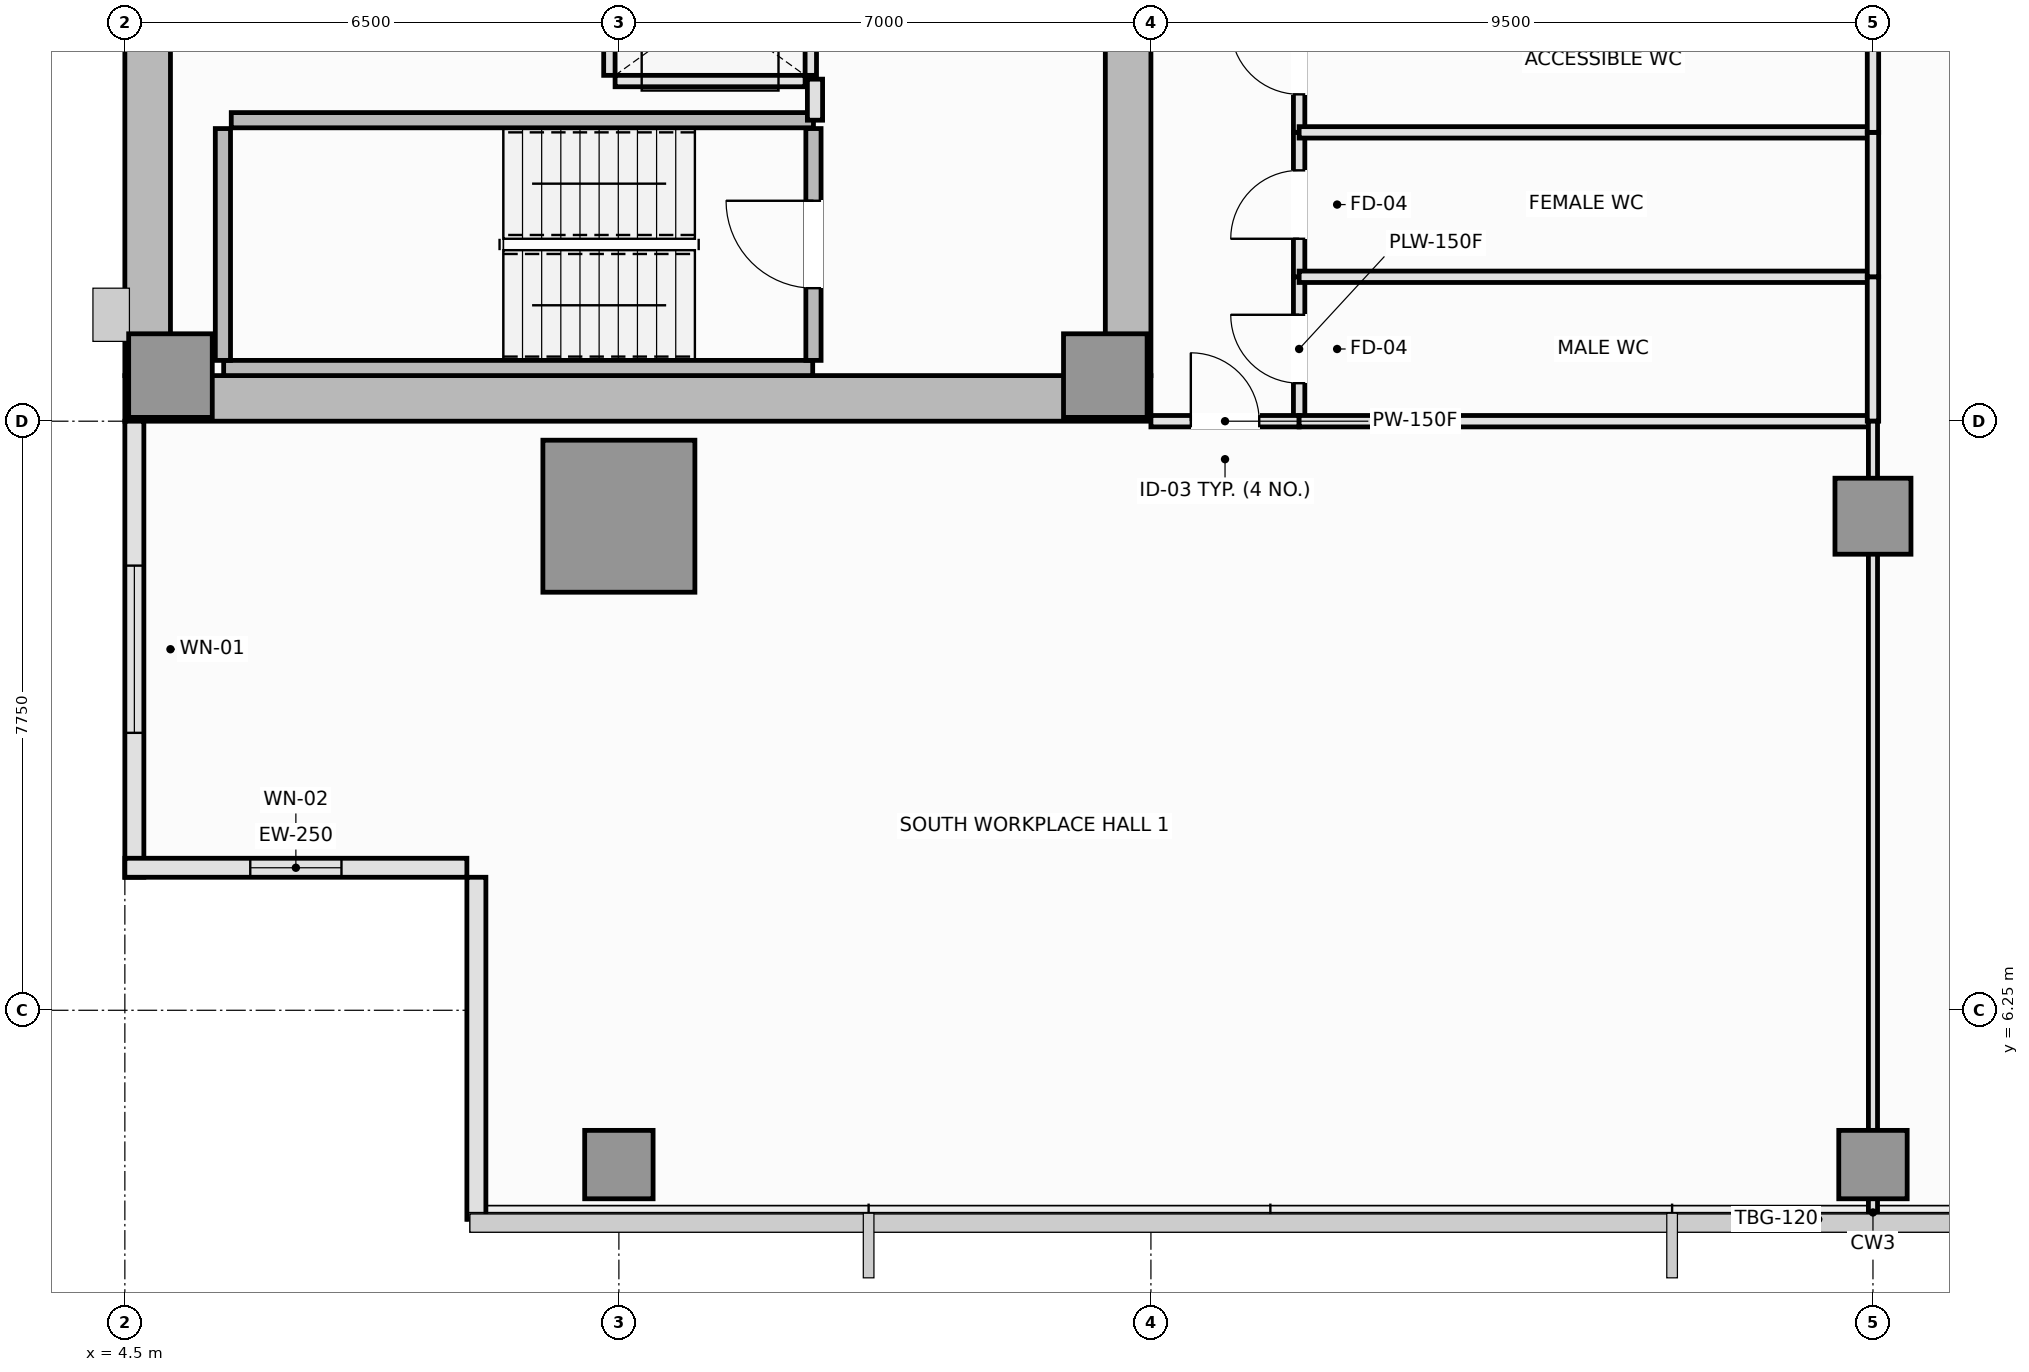
"""IFC4 building model, lengths in metres.
Left out: names, types, materials, properties, quantities, classifications, styles, units other than length and angle.
Written with IfcOpenShell. Run it as: python <this file> out.ifc"""

import sys

from ifc_helpers import new_model, si_unit, direction, frame, frame_2d, origin, origin_2d, place, context, subcontext, project, spatial, rectangle, extrude, element, fill, save


model = new_model("IFC4")
c1 = context("Model", 3, precision=1e-05, world=origin(), true_north=direction((0.0, 1.0)))
c2 = subcontext(c1, "Body", "Model", "MODEL_VIEW")
j1 = project(units=[si_unit("LENGTHUNIT", "METRE"), si_unit("PLANEANGLEUNIT", "RADIAN")], contexts=[c1])
p1 = place(None, origin())
s1 = spatial("IfcSite", under=j1, at=p1, CompositionType="ELEMENT")
p2 = place(p1, origin())
s2 = spatial("IfcBuilding", under=s1, at=p2, CompositionType="ELEMENT")
p3 = place(p2, frame((0.0, 0.0, 116.45)))
s3 = spatial("IfcBuildingStorey", under=s2, at=p3, CompositionType="ELEMENT", Elevation=116.45)
p4 = place(p3, frame((4.5, 14.3, 0.0), z_axis=(0.0, 0.0, 1.0), x_axis=(1.0, 0.0, 0.0)))
e1 = element("IfcWall", 1, at=p4, inside=s3, PredefinedType="SHEAR", context=c2, shape_type="SweptSolid", body=[
    extrude(rectangle(XDim=13.5, YDim=0.6, at=frame_2d((6.75, 0.0))), origin(), (0.0, 0.0, 1.0), 3.55),
])
p5 = place(p3, frame((4.8, 14.6, 0.0), z_axis=(0.0, 0.0, 1.0), x_axis=(0.0, 1.0, 0.0)))
e2 = element("IfcWall", 2, at=p5, inside=s3, PredefinedType="SHEAR", context=c2, shape_type="SweptSolid", body=[
    extrude(rectangle(XDim=21.3, YDim=0.6, at=frame_2d((10.65, 0.0))), origin(), (0.0, 0.0, 1.0), 3.55),
])
p6 = place(p3, frame((17.7, 14.6, 0.0), z_axis=(0.0, 0.0, 1.0), x_axis=(0.0, 1.0, 0.0)))
e3 = element("IfcWall", 3, at=p6, inside=s3, PredefinedType="SHEAR", context=c2, shape_type="SweptSolid", body=[
    extrude(rectangle(XDim=8.85, YDim=0.6, at=frame_2d((4.425, 0.0))), origin(), (0.0, 0.0, 1.0), 3.55),
])
p7 = place(p6, frame((4.3, 0.0, 0.0)))
e4 = element("IfcOpeningElement", 4, at=p7, cuts=e3, PredefinedType="OPENING", context=c2, shape_type="SweptSolid", body=[
    extrude(rectangle(XDim=1.1, YDim=2.15, at=frame_2d((0.55, 1.075))), frame((0.0, 0.31, 0.0), z_axis=(0.0, -1.0, 0.0), x_axis=(1.0, 0.0, 0.0)), (0.0, 0.0, 1.0), 0.62),
])
for number, where, z_axis, x_axis in (
    (5, (5.1, 14.6, 0.0), (0.0, 0.0, 1.0), (1.0, 0.0, 0.0)),
    (6, (17.4, 14.6, 0.0), (0.0, 0.0, 1.0), (1.0, 0.0, 0.0)),
):
    element("IfcColumn", number, at=place(p3, frame(where, z_axis=z_axis, x_axis=x_axis)), inside=s3, PredefinedType="PILASTER", context=c2, shape_type="SweptSolid", body=[
        extrude(rectangle(XDim=1.1, YDim=1.1, at=origin_2d()), origin(), (0.0, 0.0, 1.0), 3.55),
    ])
p8 = place(p3, frame((11.0, 12.75, 0.0), z_axis=(0.0, 0.0, 1.0), x_axis=(1.0, 0.0, 0.0)))
e7 = element("IfcColumn", 7, at=p8, inside=s3, PredefinedType="COLUMN", context=c2, shape_type="SweptSolid", body=[
    extrude(rectangle(XDim=2.0, YDim=2.0, at=origin_2d()), origin(), (0.0, 0.0, 1.0), 3.55),
])
p9 = place(p3, frame((27.5, 12.75, 0.0), z_axis=(0.0, 0.0, 1.0), x_axis=(1.0, 0.0, 0.0)))
e8 = element("IfcColumn", 8, at=p9, inside=s3, PredefinedType="COLUMN", context=c2, shape_type="SweptSolid", body=[
    extrude(rectangle(XDim=1.0, YDim=1.0, at=origin_2d()), origin(), (0.0, 0.0, 1.0), 3.55),
])
for number, where, z_axis, x_axis in (
    (9, (11.0, 4.22, 0.0), (0.0, 0.0, 1.0), (1.0, 0.0, 0.0)),
    (10, (27.5, 4.22, 0.0), (0.0, 0.0, 1.0), (1.0, 0.0, 0.0)),
):
    element("IfcColumn", number, at=place(p3, frame(where, z_axis=z_axis, x_axis=x_axis)), inside=s3, PredefinedType="COLUMN", context=c2, shape_type="SweptSolid", body=[
        extrude(rectangle(XDim=0.9, YDim=0.9, at=origin_2d()), origin(), (0.0, 0.0, 1.0), 3.55),
    ])
p10 = place(p3, frame((4.625, 14.0, 0.0), z_axis=(0.0, 0.0, 1.0), x_axis=(0.0, -1.0, 0.0)))
e11 = element("IfcWall", 11, at=p10, inside=s3, PredefinedType="SOLIDWALL", context=c2, shape_type="SweptSolid", body=[
    extrude(rectangle(XDim=6.0, YDim=0.25, at=frame_2d((3.0, 0.0))), origin(), (0.0, 0.0, 1.0), 3.37),
])
p11 = place(p10, frame((1.9, 0.0, 0.9)))
e12 = element("IfcOpeningElement", 12, at=p11, cuts=e11, PredefinedType="OPENING", context=c2, shape_type="SweptSolid", body=[
    extrude(rectangle(XDim=2.2, YDim=1.8, at=frame_2d((1.1, 0.9))), frame((0.0, 0.135, 0.0), z_axis=(0.0, -1.0, 0.0), x_axis=(1.0, 0.0, 0.0)), (0.0, 0.0, 1.0), 0.27),
])
p12 = place(p3, frame((4.5, 8.125, 0.0), z_axis=(0.0, 0.0, 1.0), x_axis=(1.0, 0.0, 0.0)))
e13 = element("IfcWall", 13, at=p12, inside=s3, PredefinedType="SOLIDWALL", context=c2, shape_type="SweptSolid", body=[
    extrude(rectangle(XDim=4.5, YDim=0.25, at=frame_2d((2.25, 0.0))), origin(), (0.0, 0.0, 1.0), 3.37),
])
p13 = place(p12, frame((1.65, 0.0, 0.9)))
e14 = element("IfcOpeningElement", 14, at=p13, cuts=e13, PredefinedType="OPENING", context=c2, shape_type="SweptSolid", body=[
    extrude(rectangle(XDim=1.2, YDim=1.8, at=frame_2d((0.6, 0.9))), frame((0.0, 0.135, 0.0), z_axis=(0.0, -1.0, 0.0), x_axis=(1.0, 0.0, 0.0)), (0.0, 0.0, 1.0), 0.27),
])
p14 = place(p3, frame((9.125, 8.0, 0.0), z_axis=(0.0, 0.0, 1.0), x_axis=(0.0, -1.0, 0.0)))
e15 = element("IfcWall", 15, at=p14, inside=s3, PredefinedType="SOLIDWALL", context=c2, shape_type="SweptSolid", body=[
    extrude(rectangle(XDim=4.5, YDim=0.25, at=frame_2d((2.25, 0.0))), origin(), (0.0, 0.0, 1.0), 3.37),
])
p15 = place(p3, frame((5.8, 14.7, 0.0), z_axis=(0.0, 0.0, 1.0), x_axis=(1.0, 0.0, 0.0)))
e16 = element("IfcWall", 16, at=p15, inside=s3, PredefinedType="SOLIDWALL", context=c2, shape_type="SweptSolid", body=[
    extrude(rectangle(XDim=7.75, YDim=0.2, at=frame_2d((3.875, 0.0))), origin(), (0.0, 0.0, 1.0), 3.55),
])
p16 = place(p3, frame((5.79, 14.8, 0.0), z_axis=(0.0, 0.0, 1.0), x_axis=(0.0, 1.0, 0.0)))
e17 = element("IfcWall", 17, at=p16, inside=s3, PredefinedType="SOLIDWALL", context=c2, shape_type="SweptSolid", body=[
    extrude(rectangle(XDim=3.05, YDim=0.2, at=frame_2d((1.525, 0.0))), origin(), (0.0, 0.0, 1.0), 3.55),
])
p17 = place(p3, frame((5.9, 17.96, 0.0), z_axis=(0.0, 0.0, 1.0), x_axis=(1.0, 0.0, 0.0)))
e18 = element("IfcWall", 18, at=p17, inside=s3, PredefinedType="SOLIDWALL", context=c2, shape_type="SweptSolid", body=[
    extrude(rectangle(XDim=7.66, YDim=0.2, at=frame_2d((3.83, 0.0))), origin(), (0.0, 0.0, 1.0), 3.55),
])
p18 = place(p3, frame((13.56, 14.8, 0.0), z_axis=(0.0, 0.0, 1.0), x_axis=(0.0, 1.0, 0.0)))
e19 = element("IfcWall", 19, at=p18, inside=s3, PredefinedType="SOLIDWALL", context=c2, shape_type="SweptSolid", body=[
    extrude(rectangle(XDim=3.05, YDim=0.2, at=frame_2d((1.525, 0.0))), origin(), (0.0, 0.0, 1.0), 3.55),
])
p19 = place(p18, frame((0.95, 0.0, 0.0)))
e20 = element("IfcOpeningElement", 20, at=p19, cuts=e19, PredefinedType="OPENING", context=c2, shape_type="SweptSolid", body=[
    extrude(rectangle(XDim=1.15, YDim=2.15, at=frame_2d((0.575, 1.075))), frame((0.0, 0.11, 0.0), z_axis=(0.0, -1.0, 0.0), x_axis=(1.0, 0.0, 0.0)), (0.0, 0.0, 1.0), 0.22),
])
p20 = place(p3, frame((10.95, 18.475, 0.0), z_axis=(0.0, 0.0, 1.0), x_axis=(1.0, 0.0, 0.0)))
e21 = element("IfcWall", 21, at=p20, inside=s3, PredefinedType="PARTITIONING", context=c2, shape_type="SweptSolid", body=[
    extrude(rectangle(XDim=2.5, YDim=0.15, at=frame_2d((1.25, 0.0))), origin(), (0.0, 0.0, 1.0), 3.37),
])
p21 = place(p3, frame((10.875, 18.55, 0.0), z_axis=(0.0, 0.0, 1.0), x_axis=(0.0, 1.0, 0.0)))
e22 = element("IfcWall", 22, at=p21, inside=s3, PredefinedType="PARTITIONING", context=c2, shape_type="SweptSolid", body=[
    extrude(rectangle(XDim=1.8, YDim=0.15, at=frame_2d((0.9, 0.0))), origin(), (0.0, 0.0, 1.0), 3.37),
])
p22 = place(p3, frame((13.525, 18.55, 0.0), z_axis=(0.0, 0.0, 1.0), x_axis=(0.0, 1.0, 0.0)))
e23 = element("IfcWall", 23, at=p22, inside=s3, PredefinedType="PARTITIONING", context=c2, shape_type="SweptSolid", body=[
    extrude(rectangle(XDim=1.8, YDim=0.15, at=frame_2d((0.9, 0.0))), origin(), (0.0, 0.0, 1.0), 3.37),
])
p23 = place(p22, frame((0.35, 0.0, 0.0)))
e24 = element("IfcOpeningElement", 24, at=p23, cuts=e23, PredefinedType="OPENING", context=c2, shape_type="SweptSolid", body=[
    extrude(rectangle(XDim=1.1, YDim=2.2, at=frame_2d((0.55, 1.1))), frame((0.0, 0.085, 0.0), z_axis=(0.0, -1.0, 0.0), x_axis=(1.0, 0.0, 0.0)), (0.0, 0.0, 1.0), 0.17),
])
p24 = place(p3, frame((13.58, 17.96, 0.0), z_axis=(0.0, 0.0, 1.0), x_axis=(0.0, 1.0, 0.0)))
e25 = element("IfcWall", 25, at=p24, inside=s3, PredefinedType="PARTITIONING", context=c2, shape_type="SweptSolid", body=[
    extrude(rectangle(XDim=0.54, YDim=0.2, at=frame_2d((0.27, 0.0))), origin(), (0.0, 0.0, 1.0), 3.37),
])
p25 = place(p3, frame((19.95, 14.0, 0.0), z_axis=(0.0, 0.0, 1.0), x_axis=(0.0, 1.0, 0.0)))
e26 = element("IfcWall", 26, at=p25, inside=s3, PredefinedType="PLUMBINGWALL", context=c2, shape_type="SweptSolid", body=[
    extrude(rectangle(XDim=1.9, YDim=0.15, at=frame_2d((0.95, 0.0))), origin(), (0.0, 0.0, 1.0), 3.37),
])
p26 = place(p25, frame((0.5, 0.0, 0.0)))
e27 = element("IfcOpeningElement", 27, at=p26, cuts=e26, PredefinedType="OPENING", context=c2, shape_type="SweptSolid", body=[
    extrude(rectangle(XDim=0.9, YDim=2.1, at=frame_2d((0.45, 1.05))), frame((0.0, 0.085, 0.0), z_axis=(0.0, -1.0, 0.0), x_axis=(1.0, 0.0, 0.0)), (0.0, 0.0, 1.0), 0.17),
])
p27 = place(p3, frame((19.95, 15.9, 0.0), z_axis=(0.0, 0.0, 1.0), x_axis=(0.0, 1.0, 0.0)))
e28 = element("IfcWall", 28, at=p27, inside=s3, PredefinedType="PLUMBINGWALL", context=c2, shape_type="SweptSolid", body=[
    extrude(rectangle(XDim=1.9, YDim=0.15, at=frame_2d((0.95, 0.0))), origin(), (0.0, 0.0, 1.0), 3.37),
])
p28 = place(p27, frame((0.5, 0.0, 0.0)))
e29 = element("IfcOpeningElement", 29, at=p28, cuts=e28, PredefinedType="OPENING", context=c2, shape_type="SweptSolid", body=[
    extrude(rectangle(XDim=0.9, YDim=2.1, at=frame_2d((0.45, 1.05))), frame((0.0, 0.085, 0.0), z_axis=(0.0, -1.0, 0.0), x_axis=(1.0, 0.0, 0.0)), (0.0, 0.0, 1.0), 0.17),
])
p29 = place(p3, frame((19.95, 17.8, 0.0), z_axis=(0.0, 0.0, 1.0), x_axis=(0.0, 1.0, 0.0)))
e30 = element("IfcWall", 30, at=p29, inside=s3, PredefinedType="PLUMBINGWALL", context=c2, shape_type="SweptSolid", body=[
    extrude(rectangle(XDim=1.9, YDim=0.15, at=frame_2d((0.95, 0.0))), origin(), (0.0, 0.0, 1.0), 3.37),
])
p30 = place(p29, frame((0.5, 0.0, 0.0)))
e31 = element("IfcOpeningElement", 31, at=p30, cuts=e30, PredefinedType="OPENING", context=c2, shape_type="SweptSolid", body=[
    extrude(rectangle(XDim=0.9, YDim=2.1, at=frame_2d((0.45, 1.05))), frame((0.0, 0.085, 0.0), z_axis=(0.0, -1.0, 0.0), x_axis=(1.0, 0.0, 0.0)), (0.0, 0.0, 1.0), 0.17),
])
p31 = place(p3, frame((18.0, 14.0, 0.0), z_axis=(0.0, 0.0, 1.0), x_axis=(1.0, 0.0, 0.0)))
e32 = element("IfcWall", 32, at=p31, inside=s3, PredefinedType="PARTITIONING", context=c2, shape_type="SweptSolid", body=[
    extrude(rectangle(XDim=1.95, YDim=0.15, at=frame_2d((0.975, 0.0))), origin(), (0.0, 0.0, 1.0), 3.37),
])
p32 = place(p31, frame((0.525, 0.0, 0.0)))
e33 = element("IfcOpeningElement", 33, at=p32, cuts=e32, PredefinedType="OPENING", context=c2, shape_type="SweptSolid", body=[
    extrude(rectangle(XDim=0.9, YDim=2.1, at=frame_2d((0.45, 1.05))), frame((0.0, 0.085, 0.0), z_axis=(0.0, -1.0, 0.0), x_axis=(1.0, 0.0, 0.0)), (0.0, 0.0, 1.0), 0.17),
])
for number, where, z_axis, x_axis in (
    (34, (19.95, 15.9, 0.0), (0.0, 0.0, 1.0), (1.0, 0.0, 0.0)),
    (35, (19.95, 14.0, 0.0), (0.0, 0.0, 1.0), (1.0, 0.0, 0.0)),
):
    element("IfcWall", number, at=place(p3, frame(where, z_axis=z_axis, x_axis=x_axis)), inside=s3, PredefinedType="PLUMBINGWALL", context=c2, shape_type="SweptSolid", body=[
        extrude(rectangle(XDim=7.55, YDim=0.15, at=frame_2d((3.775, 0.0))), origin(), (0.0, 0.0, 1.0), 3.37),
    ])
p33 = place(p3, frame((27.5, 14.0, 0.0), z_axis=(0.0, 0.0, 1.0), x_axis=(0.0, 1.0, 0.0)))
e36 = element("IfcWall", 36, at=p33, inside=s3, PredefinedType="PLUMBINGWALL", context=c2, shape_type="SweptSolid", body=[
    extrude(rectangle(XDim=1.9, YDim=0.15, at=frame_2d((0.95, 0.0))), origin(), (0.0, 0.0, 1.0), 3.37),
])
p34 = place(p3, frame((19.95, 17.8, 0.0), z_axis=(0.0, 0.0, 1.0), x_axis=(1.0, 0.0, 0.0)))
e37 = element("IfcWall", 37, at=p34, inside=s3, PredefinedType="PLUMBINGWALL", context=c2, shape_type="SweptSolid", body=[
    extrude(rectangle(XDim=7.55, YDim=0.15, at=frame_2d((3.775, 0.0))), origin(), (0.0, 0.0, 1.0), 3.37),
])
p35 = place(p3, frame((27.5, 15.9, 0.0), z_axis=(0.0, 0.0, 1.0), x_axis=(0.0, 1.0, 0.0)))
e38 = element("IfcWall", 38, at=p35, inside=s3, PredefinedType="PLUMBINGWALL", context=c2, shape_type="SweptSolid", body=[
    extrude(rectangle(XDim=1.9, YDim=0.15, at=frame_2d((0.95, 0.0))), origin(), (0.0, 0.0, 1.0), 3.37),
])
p36 = place(p3, frame((27.5, 17.8, 0.0), z_axis=(0.0, 0.0, 1.0), x_axis=(0.0, 1.0, 0.0)))
e39 = element("IfcWall", 39, at=p36, inside=s3, PredefinedType="PLUMBINGWALL", context=c2, shape_type="SweptSolid", body=[
    extrude(rectangle(XDim=1.9, YDim=0.15, at=frame_2d((0.95, 0.0))), origin(), (0.0, 0.0, 1.0), 3.37),
])
p37 = place(p3, frame((27.5, 3.51, 0.0), z_axis=(0.0, 0.0, 1.0), x_axis=(0.0, 1.0, 0.0)))
e40 = element("IfcWall", 40, at=p37, inside=s3, PredefinedType="PARTITIONING", context=c2, shape_type="SweptSolid", body=[
    extrude(rectangle(XDim=10.49, YDim=0.12, at=frame_2d((5.245, 0.0))), origin(), (0.0, 0.0, 1.0), 2.87),
])
p38 = place(p11, origin())
e41 = element("IfcWindow", 41, at=p38, inside=s3, PartitioningType="SINGLE_PANEL", PredefinedType="WINDOW", context=c2, shape_type="SweptSolid", body=[
    extrude(rectangle(XDim=2.2, YDim=1.8, at=frame_2d((1.1, 0.9))), frame((0.0, 0.03, 0.0), z_axis=(0.0, -1.0, 0.0), x_axis=(1.0, 0.0, 0.0)), (0.0, 0.0, 1.0), 0.06),
])
fill(e12, e41)
p39 = place(p13, origin())
e42 = element("IfcWindow", 42, at=p39, inside=s3, PartitioningType="SINGLE_PANEL", PredefinedType="WINDOW", context=c2, shape_type="SweptSolid", body=[
    extrude(rectangle(XDim=1.2, YDim=1.8, at=frame_2d((0.6, 0.9))), frame((0.0, 0.03, 0.0), z_axis=(0.0, -1.0, 0.0), x_axis=(1.0, 0.0, 0.0)), (0.0, 0.0, 1.0), 0.06),
])
fill(e14, e42)
p40 = place(p19, origin())
e43 = element("IfcDoor", 43, at=p40, inside=s3, OperationType="SINGLE_SWING_RIGHT", PredefinedType="DOOR", context=c2, shape_type="SweptSolid", body=[
    extrude(rectangle(XDim=1.15, YDim=2.15, at=frame_2d((0.575, 1.075))), frame((0.0, 0.025, 0.0), z_axis=(0.0, -1.0, 0.0), x_axis=(1.0, 0.0, 0.0)), (0.0, 0.0, 1.0), 0.05),
])
fill(e20, e43)
p41 = place(p26, origin())
e44 = element("IfcDoor", 44, at=p41, inside=s3, OperationType="SINGLE_SWING_RIGHT", PredefinedType="DOOR", context=c2, shape_type="SweptSolid", body=[
    extrude(rectangle(XDim=0.9, YDim=2.1, at=frame_2d((0.45, 1.05))), frame((0.0, 0.025, 0.0), z_axis=(0.0, -1.0, 0.0), x_axis=(1.0, 0.0, 0.0)), (0.0, 0.0, 1.0), 0.05),
])
fill(e27, e44)
p42 = place(p28, origin())
e45 = element("IfcDoor", 45, at=p42, inside=s3, OperationType="SINGLE_SWING_LEFT", PredefinedType="DOOR", context=c2, shape_type="SweptSolid", body=[
    extrude(rectangle(XDim=0.9, YDim=2.1, at=frame_2d((0.45, 1.05))), frame((0.0, 0.025, 0.0), z_axis=(0.0, -1.0, 0.0), x_axis=(1.0, 0.0, 0.0)), (0.0, 0.0, 1.0), 0.05),
])
fill(e29, e45)
p43 = place(p30, origin())
e46 = element("IfcDoor", 46, at=p43, inside=s3, OperationType="SINGLE_SWING_RIGHT", PredefinedType="DOOR", context=c2, shape_type="SweptSolid", body=[
    extrude(rectangle(XDim=0.9, YDim=2.1, at=frame_2d((0.45, 1.05))), frame((0.0, 0.025, 0.0), z_axis=(0.0, -1.0, 0.0), x_axis=(1.0, 0.0, 0.0)), (0.0, 0.0, 1.0), 0.05),
])
fill(e31, e46)
p44 = place(p32, origin())
e47 = element("IfcDoor", 47, at=p44, inside=s3, OperationType="SINGLE_SWING_LEFT", PredefinedType="DOOR", context=c2, shape_type="SweptSolid", body=[
    extrude(rectangle(XDim=0.9, YDim=2.1, at=frame_2d((0.45, 1.05))), frame((0.0, 0.025, 0.0), z_axis=(0.0, -1.0, 0.0), x_axis=(1.0, 0.0, 0.0)), (0.0, 0.0, 1.0), 0.05),
])
fill(e33, e47)
save(model, sys.argv[1])
